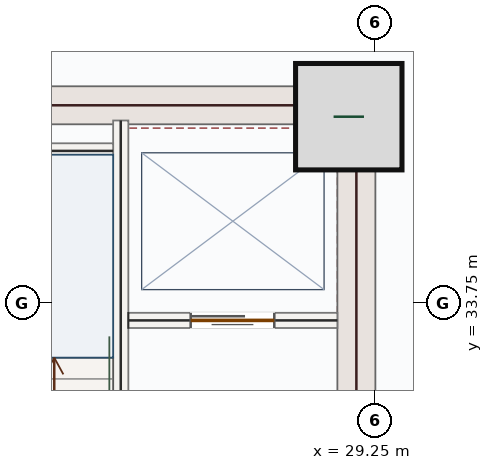
"""IFC4 building model, lengths in metres.
Left out: names, types, materials, properties, quantities, classifications, styles, units other than length and angle.
Written with IfcOpenShell. Run it as: python <this file> out.ifc"""

import sys

from ifc_helpers import new_model, si_unit, direction, frame, frame_2d, origin, origin_2d, place, context, subcontext, project, spatial, rectangle, extrude, source, transform, mapped, element, fill, save


model = new_model("IFC4")
c1 = context("Model", 3, precision=1e-05, world=origin(), true_north=direction((0.0, 1.0)))
c2 = subcontext(c1, "Body", "Model", "MODEL_VIEW")
j1 = project(units=[si_unit("LENGTHUNIT", "METRE"), si_unit("PLANEANGLEUNIT", "RADIAN")], contexts=[c1])
p1 = place(None, origin())
s1 = spatial("IfcSite", under=j1, at=p1, CompositionType="ELEMENT")
p2 = place(p1, origin())
s2 = spatial("IfcBuilding", under=s1, at=p2, CompositionType="ELEMENT")
p3 = place(p2, frame((0.0, 0.0, 92.1)))
s3 = spatial("IfcBuildingStorey", under=s2, at=p3, CompositionType="ELEMENT", Elevation=92.1)
p4 = place(p3, frame((29.0, 28.05, 0.0), z_axis=(0.0, 0.0, 1.0), x_axis=(0.0, 1.0, 0.0)))
e1 = element("IfcWall", 1, at=p4, inside=s3, PredefinedType="SHEAR", context=c2, shape_type="SweptSolid", body=[
    extrude(rectangle(XDim=8.55, YDim=0.5, at=frame_2d((4.275, 0.0))), origin(), (0.0, 0.0, 1.0), 3.95),
])
p5 = place(p4, frame((1.5, 0.0, 0.0)))
e2 = element("IfcOpeningElement", 2, at=p5, cuts=e1, PredefinedType="OPENING", context=c2, shape_type="SweptSolid", body=[
    extrude(rectangle(XDim=1.1, YDim=2.2, at=frame_2d((0.55, 1.1))), frame((0.0, 0.26, 0.0), z_axis=(0.0, -1.0, 0.0), x_axis=(1.0, 0.0, 0.0)), (0.0, 0.0, 1.0), 0.52),
])
m1 = source(origin(), c2, "Body", "SweptSolid", [
    extrude(rectangle(XDim=7.0, YDim=0.5, at=frame_2d((3.5, 0.0))), origin(), (0.0, 0.0, 1.0), 3.95),
])
p6 = place(p3, frame((21.75, 36.35, 0.0), z_axis=(0.0, 0.0, 1.0), x_axis=(1.0, 0.0, 0.0)))
e3 = element("IfcWall", 3, at=p6, inside=s3, PredefinedType="SHEAR", context=c2, shape_type="MappedRepresentation", body=[
    mapped(m1, transform((0.0, 0.0, 0.0), x_axis=(1.0, 0.0, 0.0), y_axis=(0.0, 1.0, 0.0), z_axis=(0.0, 0.0, 1.0), scale=1.0)),
])
m2 = source(origin(), c2, "Body", "SweptSolid", [
    extrude(rectangle(XDim=1.4, YDim=1.4, at=origin_2d()), origin(), (0.0, 0.0, 1.0), 4.2),
])
p7 = place(p3, frame((28.9, 36.2, 0.0), z_axis=(0.0, 0.0, 1.0), x_axis=(1.0, 0.0, 0.0)))
e4 = element("IfcColumn", 4, at=p7, inside=s3, PredefinedType="COLUMN", context=c2, shape_type="MappedRepresentation", body=[
    mapped(m2, transform((0.0, 0.0, 0.0), x_axis=(1.0, 0.0, 0.0), y_axis=(0.0, 1.0, 0.0), z_axis=(0.0, 0.0, 1.0), scale=1.0)),
])
p8 = place(p3, frame((25.9, 28.15, 0.0), z_axis=(0.0, 0.0, 1.0), x_axis=(0.0, 1.0, 0.0)))
e5 = element("IfcWall", 5, at=p8, inside=s3, PredefinedType="SOLIDWALL", context=c2, shape_type="SweptSolid", body=[
    extrude(rectangle(XDim=8.0, YDim=0.2, at=frame_2d((4.0, 0.0))), origin(), (0.0, 0.0, 1.0), 3.95),
])
p9 = place(p8, frame((0.4, 0.0, 0.0)))
e6 = element("IfcOpeningElement", 6, at=p9, cuts=e5, PredefinedType="OPENING", context=c2, shape_type="SweptSolid", body=[
    extrude(rectangle(XDim=1.05, YDim=2.15, at=frame_2d((0.525, 1.075))), frame((0.0, 0.11, 0.0), z_axis=(0.0, -1.0, 0.0), x_axis=(1.0, 0.0, 0.0)), (0.0, 0.0, 1.0), 0.22),
])
m3 = source(origin(), c2, "Body", "SweptSolid", [
    extrude(rectangle(XDim=3.25, YDim=0.2, at=frame_2d((1.625, 0.0))), origin(), (0.0, 0.0, 1.0), 3.95),
])
p10 = place(p3, frame((22.55, 35.75, 0.0), z_axis=(0.0, 0.0, 1.0), x_axis=(1.0, 0.0, 0.0)))
e7 = element("IfcWall", 7, at=p10, inside=s3, PredefinedType="SOLIDWALL", context=c2, shape_type="MappedRepresentation", body=[
    mapped(m3, transform((0.0, 0.0, 0.0), x_axis=(1.0, 0.0, 0.0), y_axis=(0.0, 1.0, 0.0), z_axis=(0.0, 0.0, 1.0), scale=1.0)),
])
p11 = place(p3, frame((26.0, 33.52, 0.0), z_axis=(0.0, 0.0, 1.0), x_axis=(1.0, 0.0, 0.0)))
e8 = element("IfcWall", 8, at=p11, inside=s3, PredefinedType="SOLIDWALL", context=c2, shape_type="SweptSolid", body=[
    extrude(rectangle(XDim=2.75, YDim=0.2, at=frame_2d((1.375, 0.0))), origin(), (0.0, 0.0, 1.0), 3.95),
])
p12 = place(p11, frame((0.82, 0.0, 0.0)))
e9 = element("IfcOpeningElement", 9, at=p12, cuts=e8, PredefinedType="OPENING", context=c2, shape_type="SweptSolid", body=[
    extrude(rectangle(XDim=1.1, YDim=2.15, at=frame_2d((0.55, 1.075))), frame((0.0, 0.11, 0.0), z_axis=(0.0, -1.0, 0.0), x_axis=(1.0, 0.0, 0.0)), (0.0, 0.0, 1.0), 0.22),
])
m4 = source(origin(), c2, "Body", "SweptSolid", [
    extrude(rectangle(XDim=1.1, YDim=2.15, at=frame_2d((0.55, 1.075))), frame((0.0, 0.025, 0.0), z_axis=(0.0, -1.0, 0.0), x_axis=(1.0, 0.0, 0.0)), (0.0, 0.0, 1.0), 0.05),
])
p13 = place(p12, origin())
e10 = element("IfcDoor", 10, at=p13, inside=s3, OperationType="DOUBLE_DOOR_SLIDING", PredefinedType="DOOR", context=c2, shape_type="MappedRepresentation", body=[
    mapped(m4, transform((0.0, 0.0, 0.0), x_axis=(1.0, 0.0, 0.0), y_axis=(0.0, 1.0, 0.0), z_axis=(0.0, 0.0, 1.0), scale=1.0)),
])
fill(e9, e10)
save(model, sys.argv[1])
